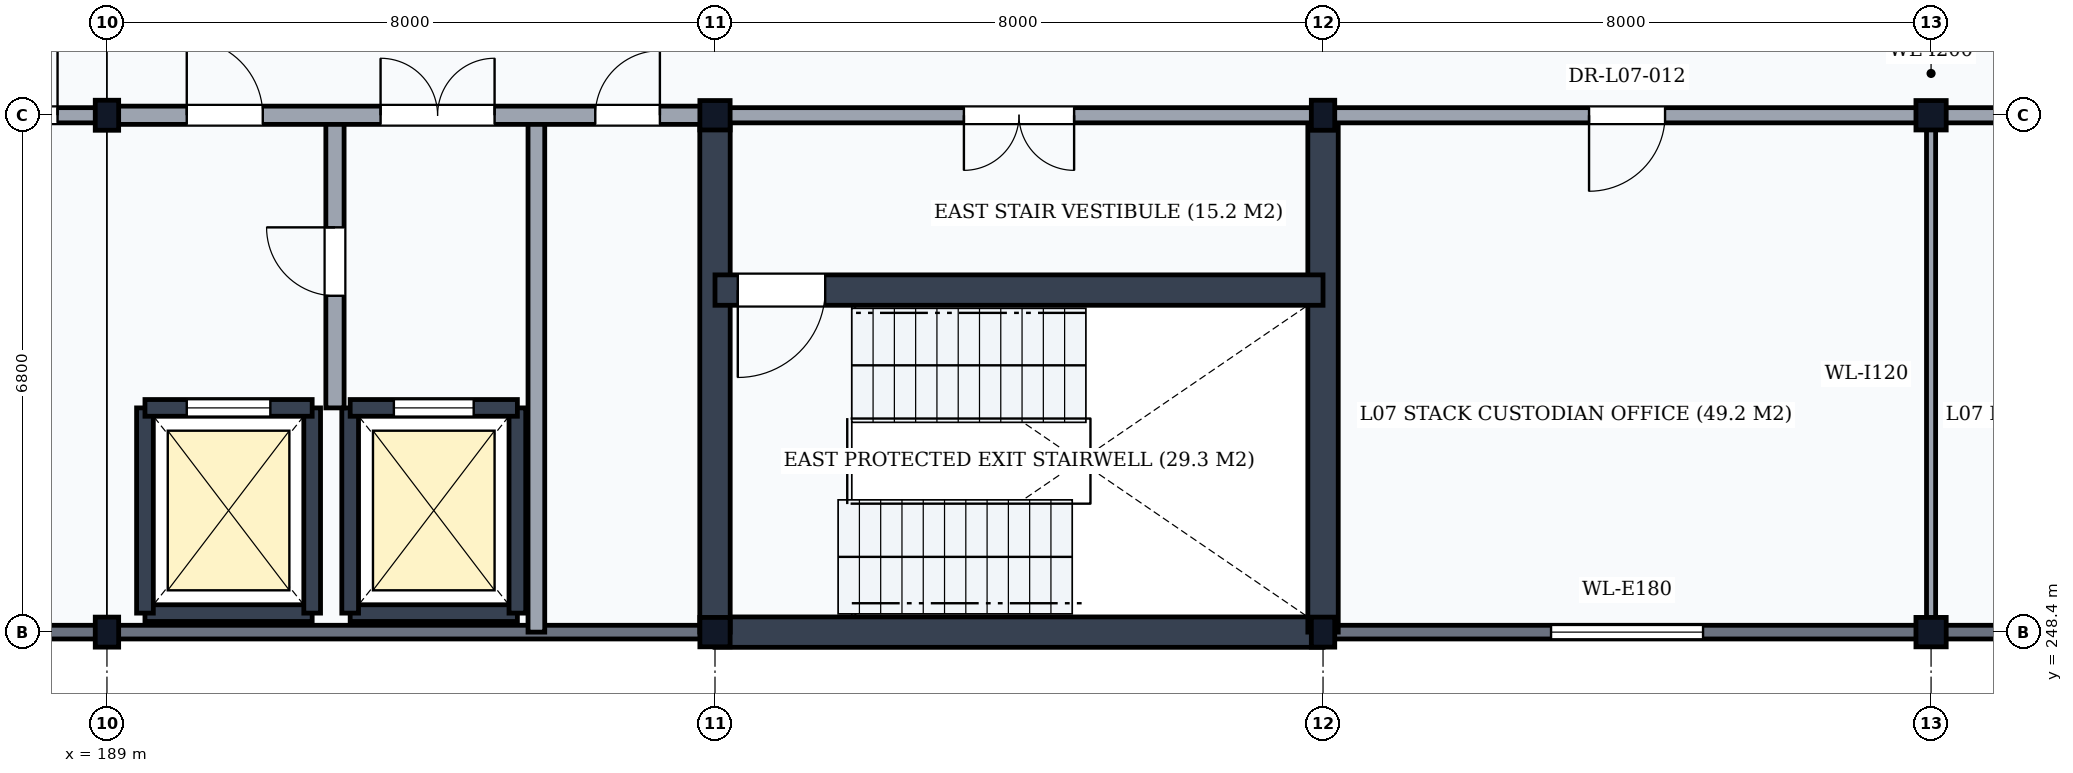
"""IFC4 building model, lengths in metres.
Left out: names, types, materials, properties, quantities, classifications, styles, units other than length and angle.
Written with IfcOpenShell. Run it as: python <this file> out.ifc"""

import sys

from ifc_helpers import new_model, si_unit, direction, frame, frame_2d, origin, origin_2d, place, context, subcontext, project, spatial, rectangle, i_section, extrude, element, fill, save


model = new_model("IFC4")
c1 = context("Model", 3, precision=1e-05, world=origin(), true_north=direction((0.0, 1.0)))
c2 = subcontext(c1, "Body", "Model", "MODEL_VIEW")
j1 = project(units=[si_unit("LENGTHUNIT", "METRE"), si_unit("PLANEANGLEUNIT", "RADIAN")], contexts=[c1])
p1 = place(None, origin())
s1 = spatial("IfcSite", under=j1, at=p1, CompositionType="ELEMENT")
p2 = place(p1, origin())
s2 = spatial("IfcBuilding", under=s1, at=p2, CompositionType="ELEMENT")
p3 = place(p2, frame((0.0, 0.0, 28.2)))
s3 = spatial("IfcBuildingStorey", under=s2, at=p3, CompositionType="ELEMENT", Elevation=28.2)
for number, where, z_axis, x_axis in (
    (1, (189.0, 248.4, 0.0), (0.0, 0.0, 1.0), (1.0, 0.0, 0.0)),
    (2, (189.0, 255.2, 0.0), (0.0, 0.0, 1.0), (1.0, 0.0, 0.0)),
):
    element("IfcColumn", number, at=place(p3, frame(where, z_axis=z_axis, x_axis=x_axis)), inside=s3, PredefinedType="COLUMN", context=c2, shape_type="SweptSolid", body=[
        extrude(i_section(OverallWidth=0.308, OverallDepth=0.395, WebThickness=0.021, FlangeThickness=0.04, FilletRadius=0.027, at=origin_2d()), origin(), (0.0, 0.0, 1.0), 3.9),
    ])
for number, where, z_axis, x_axis in (
    (3, (197.0, 248.4, 0.0), (0.0, 0.0, 1.0), (1.0, 0.0, 0.0)),
    (4, (197.0, 255.2, 0.0), (0.0, 0.0, 1.0), (1.0, 0.0, 0.0)),
):
    element("IfcColumn", number, at=place(p3, frame(where, z_axis=z_axis, x_axis=x_axis)), inside=s3, PredefinedType="COLUMN", context=c2, shape_type="SweptSolid", body=[
        extrude(i_section(OverallWidth=0.398, OverallDepth=0.387, WebThickness=0.021, FlangeThickness=0.033, FilletRadius=0.015, at=origin_2d()), origin(), (0.0, 0.0, 1.0), 3.9),
    ])
for number, where, z_axis, x_axis in (
    (5, (205.0, 248.4, 0.0), (0.0, 0.0, 1.0), (1.0, 0.0, 0.0)),
    (6, (205.0, 255.2, 0.0), (0.0, 0.0, 1.0), (1.0, 0.0, 0.0)),
):
    element("IfcColumn", number, at=place(p3, frame(where, z_axis=z_axis, x_axis=x_axis)), inside=s3, PredefinedType="COLUMN", context=c2, shape_type="SweptSolid", body=[
        extrude(i_section(OverallWidth=0.308, OverallDepth=0.395, WebThickness=0.021, FlangeThickness=0.04, FilletRadius=0.027, at=origin_2d()), origin(), (0.0, 0.0, 1.0), 3.9),
    ])
for number, where, z_axis, x_axis in (
    (7, (213.0, 248.4, 0.0), (0.0, 0.0, 1.0), (1.0, 0.0, 0.0)),
    (8, (213.0, 255.2, 0.0), (0.0, 0.0, 1.0), (1.0, 0.0, 0.0)),
):
    element("IfcColumn", number, at=place(p3, frame(where, z_axis=z_axis, x_axis=x_axis)), inside=s3, PredefinedType="COLUMN", context=c2, shape_type="SweptSolid", body=[
        extrude(i_section(OverallWidth=0.398, OverallDepth=0.387, WebThickness=0.021, FlangeThickness=0.033, FilletRadius=0.015, at=origin_2d()), origin(), (0.0, 0.0, 1.0), 3.9),
    ])
p4 = place(p3, frame((181.006, 248.4, 0.0), z_axis=(0.0, 0.0, 1.0), x_axis=(1.0, 0.0, 0.0)))
e9 = element("IfcWall", 9, at=p4, inside=s3, PredefinedType="SOLIDWALL", context=c2, shape_type="SweptSolid", body=[
    extrude(rectangle(XDim=7.988, YDim=0.18, at=frame_2d((3.994, 0.0))), origin(), (0.0, 0.0, 1.0), 3.348),
])
p5 = place(p4, frame((3.094, 0.0, 0.95)))
e10 = element("IfcOpeningElement", 10, at=p5, cuts=e9, PredefinedType="OPENING", context=c2, shape_type="SweptSolid", body=[
    extrude(rectangle(XDim=1.2, YDim=1.8, at=frame_2d((0.6, 0.9))), frame((0.0, 0.105, 0.0), z_axis=(0.0, -1.0, 0.0), x_axis=(1.0, 0.0, 0.0)), (0.0, 0.0, 1.0), 0.21),
])
p6 = place(p3, frame((189.006, 248.4, 0.0), z_axis=(0.0, 0.0, 1.0), x_axis=(1.0, 0.0, 0.0)))
e11 = element("IfcWall", 11, at=p6, inside=s3, PredefinedType="SOLIDWALL", context=c2, shape_type="SweptSolid", body=[
    extrude(rectangle(XDim=7.988, YDim=0.18, at=frame_2d((3.994, 0.0))), origin(), (0.0, 0.0, 1.0), 3.348),
])
p7 = place(p3, frame((205.006, 248.4, 0.0), z_axis=(0.0, 0.0, 1.0), x_axis=(1.0, 0.0, 0.0)))
e12 = element("IfcWall", 12, at=p7, inside=s3, PredefinedType="SOLIDWALL", context=c2, shape_type="SweptSolid", body=[
    extrude(rectangle(XDim=7.988, YDim=0.18, at=frame_2d((3.994, 0.0))), origin(), (0.0, 0.0, 1.0), 3.348),
])
p8 = place(p7, frame((2.994, 0.0, 0.95)))
e13 = element("IfcOpeningElement", 13, at=p8, cuts=e12, PredefinedType="OPENING", context=c2, shape_type="SweptSolid", body=[
    extrude(rectangle(XDim=2.0, YDim=2.1, at=frame_2d((1.0, 1.05))), frame((0.0, 0.105, 0.0), z_axis=(0.0, -1.0, 0.0), x_axis=(1.0, 0.0, 0.0)), (0.0, 0.0, 1.0), 0.21),
])
p9 = place(p3, frame((213.006, 248.4, 0.0), z_axis=(0.0, 0.0, 1.0), x_axis=(1.0, 0.0, 0.0)))
e14 = element("IfcWall", 14, at=p9, inside=s3, PredefinedType="SOLIDWALL", context=c2, shape_type="SweptSolid", body=[
    extrude(rectangle(XDim=7.988, YDim=0.18, at=frame_2d((3.994, 0.0))), origin(), (0.0, 0.0, 1.0), 3.348),
])
p10 = place(p9, frame((3.094, 0.0, 0.95)))
e15 = element("IfcOpeningElement", 15, at=p10, cuts=e14, PredefinedType="OPENING", context=c2, shape_type="SweptSolid", body=[
    extrude(rectangle(XDim=1.8, YDim=2.0, at=frame_2d((0.9, 1.0))), frame((0.0, 0.105, 0.0), z_axis=(0.0, -1.0, 0.0), x_axis=(1.0, 0.0, 0.0)), (0.0, 0.0, 1.0), 0.21),
])
p11 = place(p3, frame((197.0, 248.4, 0.0), z_axis=(0.0, 0.0, 1.0), x_axis=(1.0, 0.0, 0.0)))
e16 = element("IfcWall", 16, at=p11, inside=s3, PredefinedType="SHEAR", context=c2, shape_type="SweptSolid", body=[
    extrude(rectangle(XDim=8.0, YDim=0.4, at=frame_2d((4.0, 0.0))), origin(), (0.0, 0.0, 1.0), 3.66),
])
for number, where, z_axis, x_axis in (
    (17, (197.0, 248.4, 0.0), (0.0, 0.0, 1.0), (0.0, 1.0, 0.0)),
    (18, (205.0, 248.4, 0.0), (0.0, 0.0, 1.0), (0.0, 1.0, 0.0)),
):
    element("IfcWall", number, at=place(p3, frame(where, z_axis=z_axis, x_axis=x_axis)), inside=s3, PredefinedType="SHEAR", context=c2, shape_type="SweptSolid", body=[
        extrude(rectangle(XDim=6.8, YDim=0.4, at=frame_2d((3.4, 0.0))), origin(), (0.0, 0.0, 1.0), 3.66),
    ])
p12 = place(p3, frame((197.0, 252.9, 0.0), z_axis=(0.0, 0.0, 1.0), x_axis=(1.0, 0.0, 0.0)))
e19 = element("IfcWall", 19, at=p12, inside=s3, PredefinedType="SHEAR", context=c2, shape_type="SweptSolid", body=[
    extrude(rectangle(XDim=8.0, YDim=0.4, at=frame_2d((4.0, 0.0))), origin(), (0.0, 0.0, 1.0), 3.66),
])
p13 = place(p12, frame((0.3, 0.0, 0.0)))
e20 = element("IfcOpeningElement", 20, at=p13, cuts=e19, PredefinedType="OPENING", context=c2, shape_type="SweptSolid", body=[
    extrude(rectangle(XDim=1.15, YDim=2.15, at=frame_2d((0.575, 1.075))), frame((0.0, 0.215, 0.0), z_axis=(0.0, -1.0, 0.0), x_axis=(1.0, 0.0, 0.0)), (0.0, 0.0, 1.0), 0.43),
])
p14 = place(p3, frame((197.0, 255.2, 0.0), z_axis=(0.0, 0.0, 1.0), x_axis=(1.0, 0.0, 0.0)))
e21 = element("IfcWall", 21, at=p14, inside=s3, PredefinedType="PARTITIONING", context=c2, shape_type="SweptSolid", body=[
    extrude(rectangle(XDim=8.0, YDim=0.2, at=frame_2d((4.0, 0.0))), origin(), (0.0, 0.0, 1.0), 3.058),
])
p15 = place(p14, frame((3.275, 0.0, 0.0)))
e22 = element("IfcOpeningElement", 22, at=p15, cuts=e21, PredefinedType="OPENING", context=c2, shape_type="SweptSolid", body=[
    extrude(rectangle(XDim=1.45, YDim=2.2, at=frame_2d((0.725, 1.1))), frame((0.0, 0.115, 0.0), z_axis=(0.0, -1.0, 0.0), x_axis=(1.0, 0.0, 0.0)), (0.0, 0.0, 1.0), 0.23),
])
p16 = place(p3, frame((189.5, 248.65, 0.0), z_axis=(0.0, 0.0, 1.0), x_axis=(1.0, 0.0, 0.0)))
e23 = element("IfcWall", 23, at=p16, inside=s3, PredefinedType="SHEAR", context=c2, shape_type="SweptSolid", body=[
    extrude(rectangle(XDim=2.2, YDim=0.22, at=frame_2d((1.1, 0.0))), origin(), (0.0, 0.0, 1.0), 3.66),
])
for number, where, z_axis, x_axis in (
    (24, (189.5, 248.65, 0.0), (0.0, 0.0, 1.0), (0.0, 1.0, 0.0)),
    (25, (191.7, 248.65, 0.0), (0.0, 0.0, 1.0), (0.0, 1.0, 0.0)),
):
    element("IfcWall", number, at=place(p3, frame(where, z_axis=z_axis, x_axis=x_axis)), inside=s3, PredefinedType="SHEAR", context=c2, shape_type="SweptSolid", body=[
        extrude(rectangle(XDim=2.7, YDim=0.22, at=frame_2d((1.35, 0.0))), origin(), (0.0, 0.0, 1.0), 3.66),
    ])
p17 = place(p3, frame((189.5, 251.35, 0.0), z_axis=(0.0, 0.0, 1.0), x_axis=(1.0, 0.0, 0.0)))
e26 = element("IfcWall", 26, at=p17, inside=s3, PredefinedType="SHEAR", context=c2, shape_type="SweptSolid", body=[
    extrude(rectangle(XDim=2.2, YDim=0.22, at=frame_2d((1.1, 0.0))), origin(), (0.0, 0.0, 1.0), 3.66),
])
p18 = place(p17, frame((0.55, 0.0, 0.0)))
e27 = element("IfcOpeningElement", 27, at=p18, cuts=e26, PredefinedType="OPENING", context=c2, shape_type="SweptSolid", body=[
    extrude(rectangle(XDim=1.1, YDim=2.15, at=frame_2d((0.55, 1.075))), frame((0.0, 0.125, 0.0), z_axis=(0.0, -1.0, 0.0), x_axis=(1.0, 0.0, 0.0)), (0.0, 0.0, 1.0), 0.25),
])
p19 = place(p3, frame((192.2, 248.65, 0.0), z_axis=(0.0, 0.0, 1.0), x_axis=(1.0, 0.0, 0.0)))
e28 = element("IfcWall", 28, at=p19, inside=s3, PredefinedType="SHEAR", context=c2, shape_type="SweptSolid", body=[
    extrude(rectangle(XDim=2.2, YDim=0.22, at=frame_2d((1.1, 0.0))), origin(), (0.0, 0.0, 1.0), 3.66),
])
for number, where, z_axis, x_axis in (
    (29, (192.2, 248.65, 0.0), (0.0, 0.0, 1.0), (0.0, 1.0, 0.0)),
    (30, (194.4, 248.65, 0.0), (0.0, 0.0, 1.0), (0.0, 1.0, 0.0)),
):
    element("IfcWall", number, at=place(p3, frame(where, z_axis=z_axis, x_axis=x_axis)), inside=s3, PredefinedType="SHEAR", context=c2, shape_type="SweptSolid", body=[
        extrude(rectangle(XDim=2.7, YDim=0.22, at=frame_2d((1.35, 0.0))), origin(), (0.0, 0.0, 1.0), 3.66),
    ])
p20 = place(p3, frame((192.2, 251.35, 0.0), z_axis=(0.0, 0.0, 1.0), x_axis=(1.0, 0.0, 0.0)))
e31 = element("IfcWall", 31, at=p20, inside=s3, PredefinedType="SHEAR", context=c2, shape_type="SweptSolid", body=[
    extrude(rectangle(XDim=2.2, YDim=0.22, at=frame_2d((1.1, 0.0))), origin(), (0.0, 0.0, 1.0), 3.66),
])
p21 = place(p20, frame((0.575, 0.0, 0.0)))
e32 = element("IfcOpeningElement", 32, at=p21, cuts=e31, PredefinedType="OPENING", context=c2, shape_type="SweptSolid", body=[
    extrude(rectangle(XDim=1.05, YDim=2.15, at=frame_2d((0.525, 1.075))), frame((0.0, 0.125, 0.0), z_axis=(0.0, -1.0, 0.0), x_axis=(1.0, 0.0, 0.0)), (0.0, 0.0, 1.0), 0.25),
])
p22 = place(p3, frame((192.0, 251.35, 0.0), z_axis=(0.0, 0.0, 1.0), x_axis=(0.0, 1.0, 0.0)))
e33 = element("IfcWall", 33, at=p22, inside=s3, PredefinedType="PARTITIONING", context=c2, shape_type="SweptSolid", body=[
    extrude(rectangle(XDim=3.85, YDim=0.24, at=frame_2d((1.925, 0.0))), origin(), (0.0, 0.0, 1.0), 3.66),
])
p23 = place(p22, frame((1.475, 0.0, 0.0)))
e34 = element("IfcOpeningElement", 34, at=p23, cuts=e33, PredefinedType="OPENING", context=c2, shape_type="SweptSolid", body=[
    extrude(rectangle(XDim=0.9, YDim=2.1, at=frame_2d((0.45, 1.05))), frame((0.0, 0.135, 0.0), z_axis=(0.0, -1.0, 0.0), x_axis=(1.0, 0.0, 0.0)), (0.0, 0.0, 1.0), 0.27),
])
p24 = place(p3, frame((194.65, 248.4, 0.0), z_axis=(0.0, 0.0, 1.0), x_axis=(0.0, 1.0, 0.0)))
e35 = element("IfcWall", 35, at=p24, inside=s3, PredefinedType="PARTITIONING", context=c2, shape_type="SweptSolid", body=[
    extrude(rectangle(XDim=6.8, YDim=0.22, at=frame_2d((3.4, 0.0))), origin(), (0.0, 0.0, 1.0), 3.66),
])
p25 = place(p3, frame((181.0, 255.2, 0.0), z_axis=(0.0, 0.0, 1.0), x_axis=(1.0, 0.0, 0.0)))
e36 = element("IfcWall", 36, at=p25, inside=s3, PredefinedType="PARTITIONING", context=c2, shape_type="SweptSolid", body=[
    extrude(rectangle(XDim=8.0, YDim=0.2, at=frame_2d((4.0, 0.0))), origin(), (0.0, 0.0, 1.0), 3.058),
])
p26 = place(p25, frame((0.85, 0.0, 0.0)))
e37 = element("IfcOpeningElement", 37, at=p26, cuts=e36, PredefinedType="OPENING", context=c2, shape_type="SweptSolid", body=[
    extrude(rectangle(XDim=0.9, YDim=2.1, at=frame_2d((0.45, 1.05))), frame((0.0, 0.115, 0.0), z_axis=(0.0, -1.0, 0.0), x_axis=(1.0, 0.0, 0.0)), (0.0, 0.0, 1.0), 0.23),
])
p27 = place(p25, frame((3.25, 0.0, 0.0)))
e38 = element("IfcOpeningElement", 38, at=p27, cuts=e36, PredefinedType="OPENING", context=c2, shape_type="SweptSolid", body=[
    extrude(rectangle(XDim=0.9, YDim=2.1, at=frame_2d((0.45, 1.05))), frame((0.0, 0.115, 0.0), z_axis=(0.0, -1.0, 0.0), x_axis=(1.0, 0.0, 0.0)), (0.0, 0.0, 1.0), 0.23),
])
p28 = place(p25, frame((5.075, 0.0, 0.0)))
e39 = element("IfcOpeningElement", 39, at=p28, cuts=e36, PredefinedType="OPENING", context=c2, shape_type="SweptSolid", body=[
    extrude(rectangle(XDim=0.95, YDim=2.1, at=frame_2d((0.475, 1.05))), frame((0.0, 0.115, 0.0), z_axis=(0.0, -1.0, 0.0), x_axis=(1.0, 0.0, 0.0)), (0.0, 0.0, 1.0), 0.23),
])
p29 = place(p25, frame((6.5, 0.0, 0.0)))
e40 = element("IfcOpeningElement", 40, at=p29, cuts=e36, PredefinedType="OPENING", context=c2, shape_type="SweptSolid", body=[
    extrude(rectangle(XDim=0.85, YDim=2.1, at=frame_2d((0.425, 1.05))), frame((0.0, 0.115, 0.0), z_axis=(0.0, -1.0, 0.0), x_axis=(1.0, 0.0, 0.0)), (0.0, 0.0, 1.0), 0.23),
])
p30 = place(p3, frame((189.0, 255.2, 0.0), z_axis=(0.0, 0.0, 1.0), x_axis=(1.0, 0.0, 0.0)))
e41 = element("IfcWall", 41, at=p30, inside=s3, PredefinedType="PARTITIONING", context=c2, shape_type="SweptSolid", body=[
    extrude(rectangle(XDim=8.0, YDim=0.24, at=frame_2d((4.0, 0.0))), origin(), (0.0, 0.0, 1.0), 3.058),
])
p31 = place(p30, frame((1.05, 0.0, 0.0)))
e42 = element("IfcOpeningElement", 42, at=p31, cuts=e41, PredefinedType="OPENING", context=c2, shape_type="SweptSolid", body=[
    extrude(rectangle(XDim=1.0, YDim=2.1, at=frame_2d((0.5, 1.05))), frame((0.0, 0.135, 0.0), z_axis=(0.0, -1.0, 0.0), x_axis=(1.0, 0.0, 0.0)), (0.0, 0.0, 1.0), 0.27),
])
p32 = place(p30, frame((3.6, 0.0, 0.0)))
e43 = element("IfcOpeningElement", 43, at=p32, cuts=e41, PredefinedType="OPENING", context=c2, shape_type="SweptSolid", body=[
    extrude(rectangle(XDim=1.5, YDim=2.25, at=frame_2d((0.75, 1.125))), frame((0.0, 0.135, 0.0), z_axis=(0.0, -1.0, 0.0), x_axis=(1.0, 0.0, 0.0)), (0.0, 0.0, 1.0), 0.27),
])
p33 = place(p30, frame((6.425, 0.0, 0.0)))
e44 = element("IfcOpeningElement", 44, at=p33, cuts=e41, PredefinedType="OPENING", context=c2, shape_type="SweptSolid", body=[
    extrude(rectangle(XDim=0.85, YDim=2.1, at=frame_2d((0.425, 1.05))), frame((0.0, 0.135, 0.0), z_axis=(0.0, -1.0, 0.0), x_axis=(1.0, 0.0, 0.0)), (0.0, 0.0, 1.0), 0.27),
])
p34 = place(p3, frame((205.0, 255.2, 0.0), z_axis=(0.0, 0.0, 1.0), x_axis=(1.0, 0.0, 0.0)))
e45 = element("IfcWall", 45, at=p34, inside=s3, PredefinedType="PARTITIONING", context=c2, shape_type="SweptSolid", body=[
    extrude(rectangle(XDim=16.0, YDim=0.2, at=frame_2d((8.0, 0.0))), origin(), (0.0, 0.0, 1.0), 3.058),
])
p35 = place(p34, frame((3.5, 0.0, 0.0)))
e46 = element("IfcOpeningElement", 46, at=p35, cuts=e45, PredefinedType="OPENING", context=c2, shape_type="SweptSolid", body=[
    extrude(rectangle(XDim=1.0, YDim=2.1, at=frame_2d((0.5, 1.05))), frame((0.0, 0.115, 0.0), z_axis=(0.0, -1.0, 0.0), x_axis=(1.0, 0.0, 0.0)), (0.0, 0.0, 1.0), 0.23),
])
p36 = place(p34, frame((11.5, 0.0, 0.0)))
e47 = element("IfcOpeningElement", 47, at=p36, cuts=e45, PredefinedType="OPENING", context=c2, shape_type="SweptSolid", body=[
    extrude(rectangle(XDim=1.0, YDim=2.1, at=frame_2d((0.5, 1.05))), frame((0.0, 0.115, 0.0), z_axis=(0.0, -1.0, 0.0), x_axis=(1.0, 0.0, 0.0)), (0.0, 0.0, 1.0), 0.23),
])
p37 = place(p3, frame((213.0, 248.4, 0.0), z_axis=(0.0, 0.0, 1.0), x_axis=(0.0, 1.0, 0.0)))
e48 = element("IfcWall", 48, at=p37, inside=s3, PredefinedType="PARTITIONING", context=c2, shape_type="SweptSolid", body=[
    extrude(rectangle(XDim=6.8, YDim=0.12, at=frame_2d((3.4, 0.0))), origin(), (0.0, 0.0, 1.0), 3.208),
])
p38 = place(p8, origin())
e49 = element("IfcWindow", 49, at=p38, inside=s3, PartitioningType="DOUBLE_PANEL_VERTICAL", PredefinedType="WINDOW", context=c2, shape_type="SweptSolid", body=[
    extrude(rectangle(XDim=2.0, YDim=2.1, at=frame_2d((1.0, 1.05))), frame((0.0, 0.03, 0.0), z_axis=(0.0, -1.0, 0.0), x_axis=(1.0, 0.0, 0.0)), (0.0, 0.0, 1.0), 0.06),
])
fill(e13, e49)
p39 = place(p13, frame((1.15, 0.0, 0.0), z_axis=(0.0, 0.0, 1.0), x_axis=(-1.0, 0.0, 0.0)))
e50 = element("IfcDoor", 50, at=p39, inside=s3, OperationType="SINGLE_SWING_RIGHT", PredefinedType="DOOR", context=c2, shape_type="SweptSolid", body=[
    extrude(rectangle(XDim=1.15, YDim=2.15, at=frame_2d((0.575, 1.075))), frame((0.0, 0.025, 0.0), z_axis=(0.0, -1.0, 0.0), x_axis=(1.0, 0.0, 0.0)), (0.0, 0.0, 1.0), 0.05),
])
fill(e20, e50)
p40 = place(p15, frame((1.45, 0.0, 0.0), z_axis=(0.0, 0.0, 1.0), x_axis=(-1.0, 0.0, 0.0)))
e51 = element("IfcDoor", 51, at=p40, inside=s3, OperationType="DOUBLE_DOOR_SINGLE_SWING", PredefinedType="DOOR", context=c2, shape_type="SweptSolid", body=[
    extrude(rectangle(XDim=1.45, YDim=2.2, at=frame_2d((0.725, 1.1))), frame((0.0, 0.025, 0.0), z_axis=(0.0, -1.0, 0.0), x_axis=(1.0, 0.0, 0.0)), (0.0, 0.0, 1.0), 0.05),
])
fill(e22, e51)
p41 = place(p18, origin())
e52 = element("IfcDoor", 52, at=p41, inside=s3, OperationType="DOUBLE_DOOR_SLIDING", PredefinedType="USERDEFINED", context=c2, shape_type="SweptSolid", body=[
    extrude(rectangle(XDim=1.1, YDim=2.15, at=frame_2d((0.55, 1.075))), frame((0.0, 0.025, 0.0), z_axis=(0.0, -1.0, 0.0), x_axis=(1.0, 0.0, 0.0)), (0.0, 0.0, 1.0), 0.05),
])
fill(e27, e52)
p42 = place(p21, origin())
e53 = element("IfcDoor", 53, at=p42, inside=s3, OperationType="DOUBLE_DOOR_SLIDING", PredefinedType="USERDEFINED", context=c2, shape_type="SweptSolid", body=[
    extrude(rectangle(XDim=1.05, YDim=2.15, at=frame_2d((0.525, 1.075))), frame((0.0, 0.025, 0.0), z_axis=(0.0, -1.0, 0.0), x_axis=(1.0, 0.0, 0.0)), (0.0, 0.0, 1.0), 0.05),
])
fill(e32, e53)
p43 = place(p23, frame((0.9, 0.0, 0.0), z_axis=(0.0, 0.0, 1.0), x_axis=(-1.0, 0.0, 0.0)))
e54 = element("IfcDoor", 54, at=p43, inside=s3, OperationType="SINGLE_SWING_LEFT", PredefinedType="DOOR", context=c2, shape_type="SweptSolid", body=[
    extrude(rectangle(XDim=0.9, YDim=2.1, at=frame_2d((0.45, 1.05))), frame((0.0, 0.025, 0.0), z_axis=(0.0, -1.0, 0.0), x_axis=(1.0, 0.0, 0.0)), (0.0, 0.0, 1.0), 0.05),
])
fill(e34, e54)
p44 = place(p29, frame((0.85, 0.0, 0.0), z_axis=(0.0, 0.0, 1.0), x_axis=(-1.0, 0.0, 0.0)))
e55 = element("IfcDoor", 55, at=p44, inside=s3, OperationType="SINGLE_SWING_LEFT", PredefinedType="DOOR", context=c2, shape_type="SweptSolid", body=[
    extrude(rectangle(XDim=0.85, YDim=2.1, at=frame_2d((0.425, 1.05))), frame((0.0, 0.025, 0.0), z_axis=(0.0, -1.0, 0.0), x_axis=(1.0, 0.0, 0.0)), (0.0, 0.0, 1.0), 0.05),
])
fill(e40, e55)
p45 = place(p31, origin())
e56 = element("IfcDoor", 56, at=p45, inside=s3, OperationType="SINGLE_SWING_LEFT", PredefinedType="DOOR", context=c2, shape_type="SweptSolid", body=[
    extrude(rectangle(XDim=1.0, YDim=2.1, at=frame_2d((0.5, 1.05))), frame((0.0, 0.025, 0.0), z_axis=(0.0, -1.0, 0.0), x_axis=(1.0, 0.0, 0.0)), (0.0, 0.0, 1.0), 0.05),
])
fill(e42, e56)
p46 = place(p32, origin())
e57 = element("IfcDoor", 57, at=p46, inside=s3, OperationType="DOUBLE_DOOR_SINGLE_SWING", PredefinedType="DOOR", context=c2, shape_type="SweptSolid", body=[
    extrude(rectangle(XDim=1.5, YDim=2.25, at=frame_2d((0.75, 1.125))), frame((0.0, 0.025, 0.0), z_axis=(0.0, -1.0, 0.0), x_axis=(1.0, 0.0, 0.0)), (0.0, 0.0, 1.0), 0.05),
])
fill(e43, e57)
p47 = place(p33, frame((0.85, 0.0, 0.0), z_axis=(0.0, 0.0, 1.0), x_axis=(-1.0, 0.0, 0.0)))
e58 = element("IfcDoor", 58, at=p47, inside=s3, OperationType="SINGLE_SWING_LEFT", PredefinedType="DOOR", context=c2, shape_type="SweptSolid", body=[
    extrude(rectangle(XDim=0.85, YDim=2.1, at=frame_2d((0.425, 1.05))), frame((0.0, 0.025, 0.0), z_axis=(0.0, -1.0, 0.0), x_axis=(1.0, 0.0, 0.0)), (0.0, 0.0, 1.0), 0.05),
])
fill(e44, e58)
p48 = place(p35, frame((1.0, 0.0, 0.0), z_axis=(0.0, 0.0, 1.0), x_axis=(-1.0, 0.0, 0.0)))
e59 = element("IfcDoor", 59, at=p48, inside=s3, OperationType="SINGLE_SWING_RIGHT", PredefinedType="DOOR", context=c2, shape_type="SweptSolid", body=[
    extrude(rectangle(XDim=1.0, YDim=2.1, at=frame_2d((0.5, 1.05))), frame((0.0, 0.025, 0.0), z_axis=(0.0, -1.0, 0.0), x_axis=(1.0, 0.0, 0.0)), (0.0, 0.0, 1.0), 0.05),
])
fill(e46, e59)
save(model, sys.argv[1])
